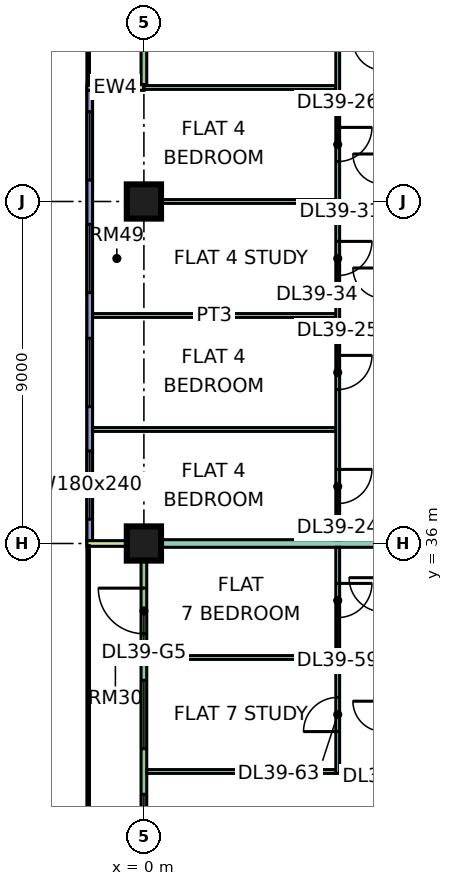
"""IFC4 building model, lengths in metres.
Left out: names, types, materials, properties, quantities, classifications, styles, units other than length and angle.
Written with IfcOpenShell. Run it as: python <this file> out.ifc"""

import sys

from ifc_helpers import new_model, si_unit, direction, frame, frame_2d, origin, origin_2d, place, context, subcontext, project, spatial, rectangle, extrude, element, fill, save


model = new_model("IFC4")
c1 = context("Model", 3, precision=1e-05, world=origin(), true_north=direction((0.0, 1.0)))
c2 = subcontext(c1, "Body", "Model", "MODEL_VIEW")
j1 = project(units=[si_unit("LENGTHUNIT", "METRE"), si_unit("PLANEANGLEUNIT", "RADIAN")], contexts=[c1])
p1 = place(None, origin())
s1 = spatial("IfcSite", under=j1, at=p1, CompositionType="ELEMENT")
p2 = place(p1, origin())
s2 = spatial("IfcBuilding", under=s1, at=p2, CompositionType="ELEMENT")
p3 = place(p2, frame((0.0, 0.0, 172.4)))
s3 = spatial("IfcBuildingStorey", under=s2, at=p3, CompositionType="ELEMENT", Elevation=172.4)
p4 = place(p3, frame((0.0, 36.0, 0.0), z_axis=(0.0, 0.0, 1.0), x_axis=(1.0, 0.0, 0.0)))
e1 = element("IfcColumn", 1, at=p4, inside=s3, PredefinedType="COLUMN", context=c2, shape_type="SweptSolid", body=[
    extrude(rectangle(XDim=0.9, YDim=0.9, at=origin_2d()), origin(), (0.0, 0.0, 1.0), 3.75),
])
p5 = place(p3, frame((0.0, 45.0, 0.0), z_axis=(0.0, 0.0, 1.0), x_axis=(1.0, 0.0, 0.0)))
e2 = element("IfcColumn", 2, at=p5, inside=s3, PredefinedType="COLUMN", context=c2, shape_type="SweptSolid", body=[
    extrude(rectangle(XDim=0.9, YDim=0.9, at=origin_2d()), origin(), (0.0, 0.0, 1.0), 3.75),
])
p6 = place(p3, frame((0.0, 61.425, 0.0), z_axis=(0.0, 0.0, 1.0), x_axis=(0.0, -1.0, 0.0)))
e3 = element("IfcWall", 3, at=p6, inside=s3, PredefinedType="SOLIDWALL", context=c2, shape_type="SweptSolid", body=[
    extrude(rectangle(XDim=13.35, YDim=0.15, at=frame_2d((6.675, 0.0))), origin(), (0.0, 0.0, 1.0), 3.35),
])
p7 = place(p6, frame((0.262, 0.0, 0.45)))
e4 = element("IfcOpeningElement", 4, at=p7, cuts=e3, PredefinedType="OPENING", context=c2, shape_type="SweptSolid", body=[
    extrude(rectangle(XDim=0.9, YDim=2.4, at=frame_2d((0.45, 1.2))), frame((0.0, 0.085, 0.0), z_axis=(0.0, -1.0, 0.0), x_axis=(1.0, 0.0, 0.0)), (0.0, 0.0, 1.0), 0.17),
])
p8 = place(p6, frame((2.025, 0.0, 0.0)))
e5 = element("IfcOpeningElement", 5, at=p8, cuts=e3, PredefinedType="OPENING", context=c2, shape_type="SweptSolid", body=[
    extrude(rectangle(XDim=1.8, YDim=2.4, at=frame_2d((0.9, 1.2))), frame((0.0, 0.085, 0.0), z_axis=(0.0, -1.0, 0.0), x_axis=(1.0, 0.0, 0.0)), (0.0, 0.0, 1.0), 0.17),
])
p9 = place(p6, frame((5.05, 0.0, 0.45)))
e6 = element("IfcOpeningElement", 6, at=p9, cuts=e3, PredefinedType="OPENING", context=c2, shape_type="SweptSolid", body=[
    extrude(rectangle(XDim=1.2, YDim=2.4, at=frame_2d((0.6, 1.2))), frame((0.0, 0.085, 0.0), z_axis=(0.0, -1.0, 0.0), x_axis=(1.0, 0.0, 0.0)), (0.0, 0.0, 1.0), 0.17),
])
p10 = place(p6, frame((9.163, 0.0, 0.45)))
e7 = element("IfcOpeningElement", 7, at=p10, cuts=e3, PredefinedType="OPENING", context=c2, shape_type="SweptSolid", body=[
    extrude(rectangle(XDim=3.0, YDim=2.4, at=frame_2d((1.5, 1.2))), frame((0.0, 0.085, 0.0), z_axis=(0.0, -1.0, 0.0), x_axis=(1.0, 0.0, 0.0)), (0.0, 0.0, 1.0), 0.17),
])
p11 = place(p3, frame((-1.5, 48.0, 0.0), z_axis=(0.0, 0.0, 1.0), x_axis=(1.0, 0.0, 0.0)))
e8 = element("IfcWall", 8, at=p11, inside=s3, PredefinedType="SOLIDWALL", context=c2, shape_type="SweptSolid", body=[
    extrude(rectangle(XDim=1.5, YDim=0.15, at=frame_2d((0.75, 0.0))), origin(), (0.0, 0.0, 1.0), 3.35),
])
p12 = place(p3, frame((-1.425, 47.925, 0.0), z_axis=(0.0, 0.0, 1.0), x_axis=(0.0, -1.0, 0.0)))
e9 = element("IfcWall", 9, at=p12, inside=s3, PredefinedType="SOLIDWALL", context=c2, shape_type="SweptSolid", body=[
    extrude(rectangle(XDim=11.85, YDim=0.15, at=frame_2d((5.925, 0.0))), origin(), (0.0, 0.0, 1.0), 3.35),
])
p13 = place(p12, frame((0.562, 0.0, 0.45)))
e10 = element("IfcOpeningElement", 10, at=p13, cuts=e9, PredefinedType="OPENING", context=c2, shape_type="SweptSolid", body=[
    extrude(rectangle(XDim=1.8, YDim=2.4, at=frame_2d((0.9, 1.2))), frame((0.0, 0.085, 0.0), z_axis=(0.0, -1.0, 0.0), x_axis=(1.0, 0.0, 0.0)), (0.0, 0.0, 1.0), 0.17),
])
p14 = place(p12, frame((3.525, 0.0, 0.45)))
e11 = element("IfcOpeningElement", 11, at=p14, cuts=e9, PredefinedType="OPENING", context=c2, shape_type="SweptSolid", body=[
    extrude(rectangle(XDim=1.8, YDim=2.4, at=frame_2d((0.9, 1.2))), frame((0.0, 0.085, 0.0), z_axis=(0.0, -1.0, 0.0), x_axis=(1.0, 0.0, 0.0)), (0.0, 0.0, 1.0), 0.17),
])
p15 = place(p12, frame((6.525, 0.0, 0.45)))
e12 = element("IfcOpeningElement", 12, at=p15, cuts=e9, PredefinedType="OPENING", context=c2, shape_type="SweptSolid", body=[
    extrude(rectangle(XDim=1.8, YDim=2.4, at=frame_2d((0.9, 1.2))), frame((0.0, 0.085, 0.0), z_axis=(0.0, -1.0, 0.0), x_axis=(1.0, 0.0, 0.0)), (0.0, 0.0, 1.0), 0.17),
])
p16 = place(p12, frame((9.488, 0.0, 0.45)))
e13 = element("IfcOpeningElement", 13, at=p16, cuts=e9, PredefinedType="OPENING", context=c2, shape_type="SweptSolid", body=[
    extrude(rectangle(XDim=1.8, YDim=2.4, at=frame_2d((0.9, 1.2))), frame((0.0, 0.085, 0.0), z_axis=(0.0, -1.0, 0.0), x_axis=(1.0, 0.0, 0.0)), (0.0, 0.0, 1.0), 0.17),
])
p17 = place(p3, frame((0.0, 35.925, 0.0), z_axis=(0.0, 0.0, 1.0), x_axis=(0.0, -1.0, 0.0)))
e14 = element("IfcWall", 14, at=p17, inside=s3, PredefinedType="SOLIDWALL", context=c2, shape_type="SweptSolid", body=[
    extrude(rectangle(XDim=11.85, YDim=0.15, at=frame_2d((5.925, 0.0))), origin(), (0.0, 0.0, 1.0), 3.35),
])
p18 = place(p17, frame((1.1, 0.0, 0.0)))
e15 = element("IfcOpeningElement", 15, at=p18, cuts=e14, PredefinedType="OPENING", context=c2, shape_type="SweptSolid", body=[
    extrude(rectangle(XDim=1.2, YDim=2.4, at=frame_2d((0.6, 1.2))), frame((0.0, 0.085, 0.0), z_axis=(0.0, -1.0, 0.0), x_axis=(1.0, 0.0, 0.0)), (0.0, 0.0, 1.0), 0.17),
])
p19 = place(p17, frame((3.525, 0.0, 0.45)))
e16 = element("IfcOpeningElement", 16, at=p19, cuts=e14, PredefinedType="OPENING", context=c2, shape_type="SweptSolid", body=[
    extrude(rectangle(XDim=1.8, YDim=2.4, at=frame_2d((0.9, 1.2))), frame((0.0, 0.085, 0.0), z_axis=(0.0, -1.0, 0.0), x_axis=(1.0, 0.0, 0.0)), (0.0, 0.0, 1.0), 0.17),
])
p20 = place(p17, frame((6.525, 0.0, 0.45)))
e17 = element("IfcOpeningElement", 17, at=p20, cuts=e14, PredefinedType="OPENING", context=c2, shape_type="SweptSolid", body=[
    extrude(rectangle(XDim=1.8, YDim=2.4, at=frame_2d((0.9, 1.2))), frame((0.0, 0.085, 0.0), z_axis=(0.0, -1.0, 0.0), x_axis=(1.0, 0.0, 0.0)), (0.0, 0.0, 1.0), 0.17),
])
p21 = place(p17, frame((9.55, 0.0, 0.45)))
e18 = element("IfcOpeningElement", 18, at=p21, cuts=e14, PredefinedType="OPENING", context=c2, shape_type="SweptSolid", body=[
    extrude(rectangle(XDim=1.2, YDim=2.4, at=frame_2d((0.6, 1.2))), frame((0.0, 0.085, 0.0), z_axis=(0.0, -1.0, 0.0), x_axis=(1.0, 0.0, 0.0)), (0.0, 0.0, 1.0), 0.17),
])
p22 = place(p3, frame((-1.5, 36.0, 0.0), z_axis=(0.0, 0.0, 1.0), x_axis=(1.0, 0.0, 0.0)))
e19 = element("IfcWall", 19, at=p22, inside=s3, PredefinedType="SOLIDWALL", context=c2, shape_type="SweptSolid", body=[
    extrude(rectangle(XDim=1.5, YDim=0.15, at=frame_2d((0.75, 0.0))), origin(), (0.0, 0.0, 1.0), 3.35),
])
p23 = place(p3, frame((-1.351, 39.0, 0.0), z_axis=(0.0, 0.0, 1.0), x_axis=(1.0, 0.0, 0.0)))
e20 = element("IfcWall", 20, at=p23, inside=s3, PredefinedType="PARTITIONING", context=c2, shape_type="SweptSolid", body=[
    extrude(rectangle(XDim=6.401, YDim=0.1, at=frame_2d((3.201, 0.0))), origin(), (0.0, 0.0, 1.0), 3.35),
])
e21 = element("IfcWall", 21, at=p4, inside=s3, PredefinedType="PARTITIONING", context=c2, shape_type="SweptSolid", body=[
    extrude(rectangle(XDim=9.5, YDim=0.2, at=frame_2d((4.75, 0.0))), origin(), (0.0, 0.0, 1.0), 3.35),
])
p24 = place(p3, frame((-1.35, 42.0, 0.0), z_axis=(0.0, 0.0, 1.0), x_axis=(1.0, 0.0, 0.0)))
e22 = element("IfcWall", 22, at=p24, inside=s3, PredefinedType="PARTITIONING", context=c2, shape_type="SweptSolid", body=[
    extrude(rectangle(XDim=6.4, YDim=0.1, at=frame_2d((3.2, 0.0))), origin(), (0.0, 0.0, 1.0), 3.35),
])
e23 = element("IfcWall", 23, at=p5, inside=s3, PredefinedType="PARTITIONING", context=c2, shape_type="SweptSolid", body=[
    extrude(rectangle(XDim=5.05, YDim=0.1, at=frame_2d((2.525, 0.0))), origin(), (0.0, 0.0, 1.0), 3.35),
])
p25 = place(p3, frame((0.0, 48.0, 0.0), z_axis=(0.0, 0.0, 1.0), x_axis=(1.0, 0.0, 0.0)))
e24 = element("IfcWall", 24, at=p25, inside=s3, PredefinedType="PARTITIONING", context=c2, shape_type="SweptSolid", body=[
    extrude(rectangle(XDim=5.05, YDim=0.1, at=frame_2d((2.525, 0.0))), origin(), (0.0, 0.0, 1.0), 3.35),
])
for number, where, z_axis, x_axis in (
    (25, (0.074, 30.0, 0.0), (0.0, 0.0, 1.0), (1.0, 0.0, 0.0)),
    (26, (0.074, 33.0, 0.0), (0.0, 0.0, 1.0), (1.0, 0.0, 0.0)),
):
    element("IfcWall", number, at=place(p3, frame(where, z_axis=z_axis, x_axis=x_axis)), inside=s3, PredefinedType="PARTITIONING", context=c2, shape_type="SweptSolid", body=[
        extrude(rectangle(XDim=4.976, YDim=0.1, at=frame_2d((2.488, 0.0))), origin(), (0.0, 0.0, 1.0), 3.35),
    ])
p26 = place(p3, frame((5.1, 29.95, 0.0), z_axis=(0.0, 0.0, 1.0), x_axis=(0.0, 1.0, 0.0)))
e27 = element("IfcWall", 27, at=p26, inside=s3, PredefinedType="PARTITIONING", context=c2, shape_type="SweptSolid", body=[
    extrude(rectangle(XDim=5.95, YDim=0.1, at=frame_2d((2.975, 0.0))), origin(), (0.0, 0.0, 1.0), 3.35),
])
p27 = place(p26, frame((4.1, 0.0, 0.0)))
e28 = element("IfcOpeningElement", 28, at=p27, cuts=e27, PredefinedType="OPENING", context=c2, shape_type="SweptSolid", body=[
    extrude(rectangle(XDim=0.9, YDim=2.1, at=frame_2d((0.45, 1.05))), frame((0.0, 0.06, 0.0), z_axis=(0.0, -1.0, 0.0), x_axis=(1.0, 0.0, 0.0)), (0.0, 0.0, 1.0), 0.12),
])
p28 = place(p26, frame((1.1, 0.0, 0.0)))
e29 = element("IfcOpeningElement", 29, at=p28, cuts=e27, PredefinedType="OPENING", context=c2, shape_type="SweptSolid", body=[
    extrude(rectangle(XDim=0.9, YDim=2.1, at=frame_2d((0.45, 1.05))), frame((0.0, 0.06, 0.0), z_axis=(0.0, -1.0, 0.0), x_axis=(1.0, 0.0, 0.0)), (0.0, 0.0, 1.0), 0.12),
])
p29 = place(p3, frame((5.1, 36.1, 0.0), z_axis=(0.0, 0.0, 1.0), x_axis=(0.0, 1.0, 0.0)))
e30 = element("IfcWall", 30, at=p29, inside=s3, PredefinedType="PARTITIONING", context=c2, shape_type="SweptSolid", body=[
    extrude(rectangle(XDim=26.826, YDim=0.1, at=frame_2d((13.413, 0.0))), origin(), (0.0, 0.0, 1.0), 3.35),
])
p30 = place(p29, frame((0.95, 0.0, 0.0)))
e31 = element("IfcOpeningElement", 31, at=p30, cuts=e30, PredefinedType="OPENING", context=c2, shape_type="SweptSolid", body=[
    extrude(rectangle(XDim=0.9, YDim=2.1, at=frame_2d((0.45, 1.05))), frame((0.0, 0.06, 0.0), z_axis=(0.0, -1.0, 0.0), x_axis=(1.0, 0.0, 0.0)), (0.0, 0.0, 1.0), 0.12),
])
p31 = place(p29, frame((3.95, 0.0, 0.0)))
e32 = element("IfcOpeningElement", 32, at=p31, cuts=e30, PredefinedType="OPENING", context=c2, shape_type="SweptSolid", body=[
    extrude(rectangle(XDim=0.9, YDim=2.1, at=frame_2d((0.45, 1.05))), frame((0.0, 0.06, 0.0), z_axis=(0.0, -1.0, 0.0), x_axis=(1.0, 0.0, 0.0)), (0.0, 0.0, 1.0), 0.12),
])
p32 = place(p29, frame((9.95, 0.0, 0.0)))
e33 = element("IfcOpeningElement", 33, at=p32, cuts=e30, PredefinedType="OPENING", context=c2, shape_type="SweptSolid", body=[
    extrude(rectangle(XDim=0.9, YDim=2.1, at=frame_2d((0.45, 1.05))), frame((0.0, 0.06, 0.0), z_axis=(0.0, -1.0, 0.0), x_axis=(1.0, 0.0, 0.0)), (0.0, 0.0, 1.0), 0.12),
])
p33 = place(p29, frame((21.95, 0.0, 0.0)))
e34 = element("IfcOpeningElement", 34, at=p33, cuts=e30, PredefinedType="OPENING", context=c2, shape_type="SweptSolid", body=[
    extrude(rectangle(XDim=0.9, YDim=2.1, at=frame_2d((0.45, 1.05))), frame((0.0, 0.06, 0.0), z_axis=(0.0, -1.0, 0.0), x_axis=(1.0, 0.0, 0.0)), (0.0, 0.0, 1.0), 0.12),
])
p34 = place(p29, frame((24.95, 0.0, 0.0)))
e35 = element("IfcOpeningElement", 35, at=p34, cuts=e30, PredefinedType="OPENING", context=c2, shape_type="SweptSolid", body=[
    extrude(rectangle(XDim=0.9, YDim=2.1, at=frame_2d((0.45, 1.05))), frame((0.0, 0.06, 0.0), z_axis=(0.0, -1.0, 0.0), x_axis=(1.0, 0.0, 0.0)), (0.0, 0.0, 1.0), 0.12),
])
p35 = place(p29, frame((15.95, 0.0, 0.0)))
e36 = element("IfcOpeningElement", 36, at=p35, cuts=e30, PredefinedType="OPENING", context=c2, shape_type="SweptSolid", body=[
    extrude(rectangle(XDim=0.9, YDim=2.1, at=frame_2d((0.45, 1.05))), frame((0.0, 0.06, 0.0), z_axis=(0.0, -1.0, 0.0), x_axis=(1.0, 0.0, 0.0)), (0.0, 0.0, 1.0), 0.12),
])
p36 = place(p29, frame((6.95, 0.0, 0.0)))
e37 = element("IfcOpeningElement", 37, at=p36, cuts=e30, PredefinedType="OPENING", context=c2, shape_type="SweptSolid", body=[
    extrude(rectangle(XDim=0.9, YDim=2.1, at=frame_2d((0.45, 1.05))), frame((0.0, 0.06, 0.0), z_axis=(0.0, -1.0, 0.0), x_axis=(1.0, 0.0, 0.0)), (0.0, 0.0, 1.0), 0.12),
])
p37 = place(p13, origin())
e38 = element("IfcWindow", 38, at=p37, inside=s3, PartitioningType="SINGLE_PANEL", PredefinedType="WINDOW", context=c2, shape_type="SweptSolid", body=[
    extrude(rectangle(XDim=1.8, YDim=2.4, at=frame_2d((0.9, 1.2))), frame((0.0, 0.03, 0.0), z_axis=(0.0, -1.0, 0.0), x_axis=(1.0, 0.0, 0.0)), (0.0, 0.0, 1.0), 0.06),
])
fill(e10, e38)
p38 = place(p14, origin())
e39 = element("IfcWindow", 39, at=p38, inside=s3, PartitioningType="SINGLE_PANEL", PredefinedType="WINDOW", context=c2, shape_type="SweptSolid", body=[
    extrude(rectangle(XDim=1.8, YDim=2.4, at=frame_2d((0.9, 1.2))), frame((0.0, 0.03, 0.0), z_axis=(0.0, -1.0, 0.0), x_axis=(1.0, 0.0, 0.0)), (0.0, 0.0, 1.0), 0.06),
])
fill(e11, e39)
p39 = place(p15, origin())
e40 = element("IfcWindow", 40, at=p39, inside=s3, PartitioningType="SINGLE_PANEL", PredefinedType="WINDOW", context=c2, shape_type="SweptSolid", body=[
    extrude(rectangle(XDim=1.8, YDim=2.4, at=frame_2d((0.9, 1.2))), frame((0.0, 0.03, 0.0), z_axis=(0.0, -1.0, 0.0), x_axis=(1.0, 0.0, 0.0)), (0.0, 0.0, 1.0), 0.06),
])
fill(e12, e40)
p40 = place(p16, origin())
e41 = element("IfcWindow", 41, at=p40, inside=s3, PartitioningType="SINGLE_PANEL", PredefinedType="WINDOW", context=c2, shape_type="SweptSolid", body=[
    extrude(rectangle(XDim=1.8, YDim=2.4, at=frame_2d((0.9, 1.2))), frame((0.0, 0.03, 0.0), z_axis=(0.0, -1.0, 0.0), x_axis=(1.0, 0.0, 0.0)), (0.0, 0.0, 1.0), 0.06),
])
fill(e13, e41)
p41 = place(p18, frame((1.2, 0.0, 0.0), z_axis=(0.0, 0.0, 1.0), x_axis=(-1.0, 0.0, 0.0)))
e42 = element("IfcDoor", 42, at=p41, inside=s3, OperationType="DOUBLE_DOOR_SINGLE_SWING", PredefinedType="DOOR", context=c2, shape_type="SweptSolid", body=[
    extrude(rectangle(XDim=1.2, YDim=2.4, at=frame_2d((0.6, 1.2))), frame((0.0, 0.025, 0.0), z_axis=(0.0, -1.0, 0.0), x_axis=(1.0, 0.0, 0.0)), (0.0, 0.0, 1.0), 0.05),
])
fill(e15, e42)
p42 = place(p19, origin())
e43 = element("IfcWindow", 43, at=p42, inside=s3, PartitioningType="SINGLE_PANEL", PredefinedType="WINDOW", context=c2, shape_type="SweptSolid", body=[
    extrude(rectangle(XDim=1.8, YDim=2.4, at=frame_2d((0.9, 1.2))), frame((0.0, 0.03, 0.0), z_axis=(0.0, -1.0, 0.0), x_axis=(1.0, 0.0, 0.0)), (0.0, 0.0, 1.0), 0.06),
])
fill(e16, e43)
p43 = place(p20, origin())
e44 = element("IfcWindow", 44, at=p43, inside=s3, PartitioningType="SINGLE_PANEL", PredefinedType="WINDOW", context=c2, shape_type="SweptSolid", body=[
    extrude(rectangle(XDim=1.8, YDim=2.4, at=frame_2d((0.9, 1.2))), frame((0.0, 0.03, 0.0), z_axis=(0.0, -1.0, 0.0), x_axis=(1.0, 0.0, 0.0)), (0.0, 0.0, 1.0), 0.06),
])
fill(e17, e44)
p44 = place(p30, origin())
e45 = element("IfcDoor", 45, at=p44, inside=s3, OperationType="SINGLE_SWING_RIGHT", PredefinedType="DOOR", context=c2, shape_type="SweptSolid", body=[
    extrude(rectangle(XDim=0.9, YDim=2.1, at=frame_2d((0.45, 1.05))), frame((0.0, 0.025, 0.0), z_axis=(0.0, -1.0, 0.0), x_axis=(1.0, 0.0, 0.0)), (0.0, 0.0, 1.0), 0.05),
])
fill(e31, e45)
p45 = place(p31, origin())
e46 = element("IfcDoor", 46, at=p45, inside=s3, OperationType="SINGLE_SWING_RIGHT", PredefinedType="DOOR", context=c2, shape_type="SweptSolid", body=[
    extrude(rectangle(XDim=0.9, YDim=2.1, at=frame_2d((0.45, 1.05))), frame((0.0, 0.025, 0.0), z_axis=(0.0, -1.0, 0.0), x_axis=(1.0, 0.0, 0.0)), (0.0, 0.0, 1.0), 0.05),
])
fill(e32, e46)
p46 = place(p32, origin())
e47 = element("IfcDoor", 47, at=p46, inside=s3, OperationType="SINGLE_SWING_RIGHT", PredefinedType="DOOR", context=c2, shape_type="SweptSolid", body=[
    extrude(rectangle(XDim=0.9, YDim=2.1, at=frame_2d((0.45, 1.05))), frame((0.0, 0.025, 0.0), z_axis=(0.0, -1.0, 0.0), x_axis=(1.0, 0.0, 0.0)), (0.0, 0.0, 1.0), 0.05),
])
fill(e33, e47)
p47 = place(p36, origin())
e48 = element("IfcDoor", 48, at=p47, inside=s3, OperationType="SINGLE_SWING_RIGHT", PredefinedType="DOOR", context=c2, shape_type="SweptSolid", body=[
    extrude(rectangle(XDim=0.9, YDim=2.1, at=frame_2d((0.45, 1.05))), frame((0.0, 0.025, 0.0), z_axis=(0.0, -1.0, 0.0), x_axis=(1.0, 0.0, 0.0)), (0.0, 0.0, 1.0), 0.05),
])
fill(e37, e48)
p48 = place(p27, origin())
e49 = element("IfcDoor", 49, at=p48, inside=s3, OperationType="SINGLE_SWING_RIGHT", PredefinedType="DOOR", context=c2, shape_type="SweptSolid", body=[
    extrude(rectangle(XDim=0.9, YDim=2.1, at=frame_2d((0.45, 1.05))), frame((0.0, 0.025, 0.0), z_axis=(0.0, -1.0, 0.0), x_axis=(1.0, 0.0, 0.0)), (0.0, 0.0, 1.0), 0.05),
])
fill(e28, e49)
p49 = place(p28, origin())
e50 = element("IfcDoor", 50, at=p49, inside=s3, OperationType="SINGLE_SWING_LEFT", PredefinedType="DOOR", context=c2, shape_type="SweptSolid", body=[
    extrude(rectangle(XDim=0.9, YDim=2.1, at=frame_2d((0.45, 1.05))), frame((0.0, 0.025, 0.0), z_axis=(0.0, -1.0, 0.0), x_axis=(1.0, 0.0, 0.0)), (0.0, 0.0, 1.0), 0.05),
])
fill(e29, e50)
save(model, sys.argv[1])
